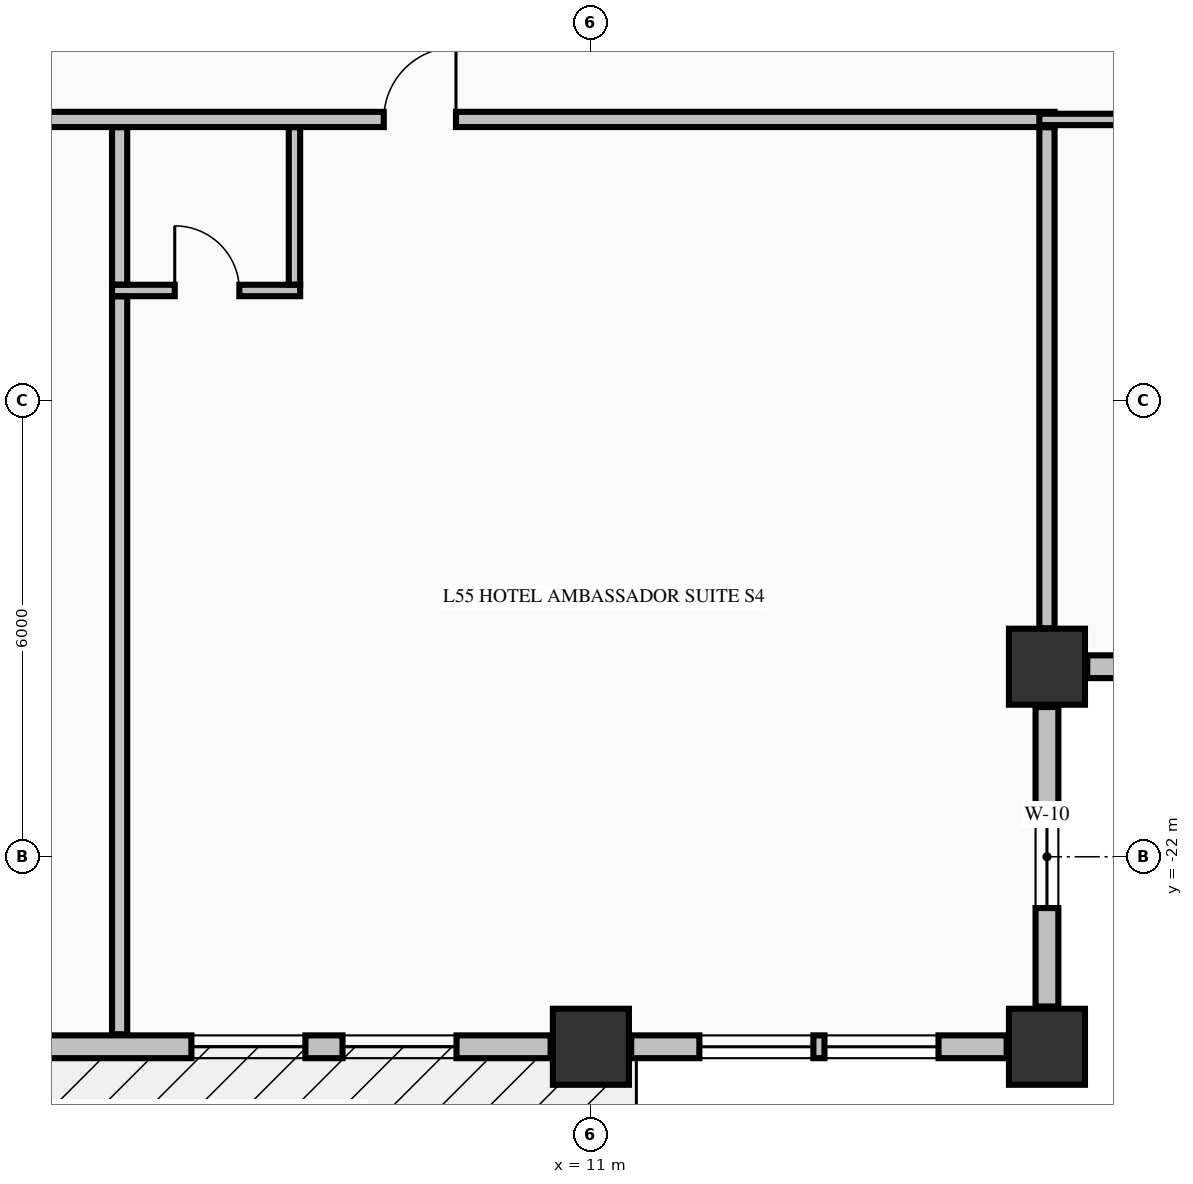
"""IFC4 building model, lengths in metres.
Left out: names, types, materials, properties, quantities, classifications, styles, units other than length and angle.
Written with IfcOpenShell. Run it as: python <this file> out.ifc"""

import sys

from ifc_helpers import new_model, si_unit, direction, frame, frame_2d, origin, origin_2d, place, context, subcontext, project, spatial, rectangle, extrude, element, fill, save


model = new_model("IFC4")
c1 = context("Model", 3, precision=1e-05, world=origin(), true_north=direction((0.0, 1.0)))
c2 = subcontext(c1, "Body", "Model", "MODEL_VIEW")
j1 = project(units=[si_unit("LENGTHUNIT", "METRE"), si_unit("PLANEANGLEUNIT", "RADIAN")], contexts=[c1])
p1 = place(None, origin())
s1 = spatial("IfcSite", under=j1, at=p1, CompositionType="ELEMENT")
p2 = place(p1, origin())
s2 = spatial("IfcBuilding", under=s1, at=p2, CompositionType="ELEMENT")
p3 = place(p2, frame((0.0, 0.0, 211.86)))
s3 = spatial("IfcBuildingStorey", under=s2, at=p3, CompositionType="ELEMENT", Elevation=211.86)
for number, where, z_axis, x_axis in (
    (1, (11.0, -24.5, -0.325), (0.0, 0.0, 1.0), (1.0, 0.0, 0.0)),
    (2, (17.0, -24.5, -0.325), (0.0, 0.0, 1.0), (1.0, 0.0, 0.0)),
    (3, (17.0, -19.5, -0.325), (0.0, 0.0, 1.0), (1.0, 0.0, 0.0)),
):
    element("IfcColumn", number, at=place(p3, frame(where, z_axis=z_axis, x_axis=x_axis)), inside=s3, PredefinedType="COLUMN", context=c2, shape_type="SweptSolid", body=[
        extrude(rectangle(XDim=1.0, YDim=1.0, at=origin_2d()), origin(), (0.0, 0.0, 1.0), 3.475),
    ])
p4 = place(p3, frame((17.0, -23.97, 0.0), z_axis=(0.0, 0.0, 1.0), x_axis=(0.0, 1.0, 0.0)))
e4 = element("IfcWall", 4, at=p4, inside=s3, PredefinedType="STANDARD", context=c2, shape_type="SweptSolid", body=[
    extrude(rectangle(XDim=3.94, YDim=0.3, at=frame_2d((1.97, 0.0))), origin(), (0.0, 0.0, 1.0), 2.542),
])
p5 = place(p4, frame((1.295, 0.0, 0.68)))
e5 = element("IfcOpeningElement", 5, at=p5, cuts=e4, PredefinedType="OPENING", context=c2, shape_type="SweptSolid", body=[
    extrude(rectangle(XDim=1.35, YDim=1.42, at=frame_2d((0.675, 0.71))), frame((0.0, 0.16, 0.0), z_axis=(0.0, -1.0, 0.0), x_axis=(1.0, 0.0, 0.0)), (0.0, 0.0, 1.0), 0.32),
])
p6 = place(p3, frame((17.53, -19.5, 0.0), z_axis=(0.0, 0.0, 1.0), x_axis=(1.0, 0.0, 0.0)))
e6 = element("IfcWall", 6, at=p6, inside=s3, PredefinedType="STANDARD", context=c2, shape_type="SweptSolid", body=[
    extrude(rectangle(XDim=3.94, YDim=0.3, at=frame_2d((1.97, 0.0))), origin(), (0.0, 0.0, 1.0), 2.542),
])
p7 = place(p6, frame((1.295, 0.0, 0.68)))
e7 = element("IfcOpeningElement", 7, at=p7, cuts=e6, PredefinedType="OPENING", context=c2, shape_type="SweptSolid", body=[
    extrude(rectangle(XDim=1.35, YDim=1.42, at=frame_2d((0.675, 0.71))), frame((0.0, 0.16, 0.0), z_axis=(0.0, -1.0, 0.0), x_axis=(1.0, 0.0, 0.0)), (0.0, 0.0, 1.0), 0.32),
])
p8 = place(p3, frame((0.53, -24.5, 0.0), z_axis=(0.0, 0.0, 1.0), x_axis=(1.0, 0.0, 0.0)))
e8 = element("IfcWall", 8, at=p8, inside=s3, PredefinedType="STANDARD", context=c2, shape_type="SweptSolid", body=[
    extrude(rectangle(XDim=9.94, YDim=0.3, at=frame_2d((4.97, 0.0))), origin(), (0.0, 0.0, 1.0), 2.542),
])
p9 = place(p8, frame((1.238, 0.0, 0.72)))
e9 = element("IfcOpeningElement", 9, at=p9, cuts=e8, PredefinedType="OPENING", context=c2, shape_type="SweptSolid", body=[
    extrude(rectangle(XDim=1.5, YDim=1.6, at=frame_2d((0.75, 0.8))), frame((0.0, 0.16, 0.0), z_axis=(0.0, -1.0, 0.0), x_axis=(1.0, 0.0, 0.0)), (0.0, 0.0, 1.0), 0.32),
])
p10 = place(p8, frame((5.214, 0.0, 0.72)))
e10 = element("IfcOpeningElement", 10, at=p10, cuts=e8, PredefinedType="OPENING", context=c2, shape_type="SweptSolid", body=[
    extrude(rectangle(XDim=1.5, YDim=1.6, at=frame_2d((0.75, 0.8))), frame((0.0, 0.16, 0.0), z_axis=(0.0, -1.0, 0.0), x_axis=(1.0, 0.0, 0.0)), (0.0, 0.0, 1.0), 0.32),
])
p11 = place(p8, frame((7.202, 0.0, 0.72)))
e11 = element("IfcOpeningElement", 11, at=p11, cuts=e8, PredefinedType="OPENING", context=c2, shape_type="SweptSolid", body=[
    extrude(rectangle(XDim=1.5, YDim=1.6, at=frame_2d((0.75, 0.8))), frame((0.0, 0.16, 0.0), z_axis=(0.0, -1.0, 0.0), x_axis=(1.0, 0.0, 0.0)), (0.0, 0.0, 1.0), 0.32),
])
p12 = place(p3, frame((11.53, -24.5, 0.0), z_axis=(0.0, 0.0, 1.0), x_axis=(1.0, 0.0, 0.0)))
e12 = element("IfcWall", 12, at=p12, inside=s3, PredefinedType="STANDARD", context=c2, shape_type="SweptSolid", body=[
    extrude(rectangle(XDim=4.94, YDim=0.3, at=frame_2d((2.47, 0.0))), origin(), (0.0, 0.0, 1.0), 2.542),
])
p13 = place(p12, frame((0.897, 0.0, 0.72)))
e13 = element("IfcOpeningElement", 13, at=p13, cuts=e12, PredefinedType="OPENING", context=c2, shape_type="SweptSolid", body=[
    extrude(rectangle(XDim=1.5, YDim=1.6, at=frame_2d((0.75, 0.8))), frame((0.0, 0.16, 0.0), z_axis=(0.0, -1.0, 0.0), x_axis=(1.0, 0.0, 0.0)), (0.0, 0.0, 1.0), 0.32),
])
p14 = place(p12, frame((2.543, 0.0, 0.72)))
e14 = element("IfcOpeningElement", 14, at=p14, cuts=e12, PredefinedType="OPENING", context=c2, shape_type="SweptSolid", body=[
    extrude(rectangle(XDim=1.5, YDim=1.6, at=frame_2d((0.75, 0.8))), frame((0.0, 0.16, 0.0), z_axis=(0.0, -1.0, 0.0), x_axis=(1.0, 0.0, 0.0)), (0.0, 0.0, 1.0), 0.32),
])
p15 = place(p3, frame((4.7, -14.55, 0.0), z_axis=(0.0, 0.0, 1.0), x_axis=(1.0, 0.0, 0.0)))
e15 = element("IfcWall", 15, at=p15, inside=s3, PredefinedType="PARTITIONING", context=c2, shape_type="SweptSolid", body=[
    extrude(rectangle(XDim=2.475, YDim=0.15, at=frame_2d((1.238, 0.0))), origin(), (0.0, 0.0, 1.0), 3.15),
])
p16 = place(p15, frame((0.825, 0.0, 0.0)))
e16 = element("IfcOpeningElement", 16, at=p16, cuts=e15, PredefinedType="OPENING", context=c2, shape_type="SweptSolid", body=[
    extrude(rectangle(XDim=0.85, YDim=2.1, at=frame_2d((0.425, 1.05))), frame((0.0, 0.085, 0.0), z_axis=(0.0, -1.0, 0.0), x_axis=(1.0, 0.0, 0.0)), (0.0, 0.0, 1.0), 0.17),
])
p17 = place(p3, frame((-22.1, -12.3, 0.0), z_axis=(0.0, 0.0, 1.0), x_axis=(1.0, 0.0, 0.0)))
e17 = element("IfcWall", 17, at=p17, inside=s3, PredefinedType="PARTITIONING", context=c2, shape_type="SweptSolid", body=[
    extrude(rectangle(XDim=39.2, YDim=0.2, at=frame_2d((19.6, 0.0))), origin(), (0.0, 0.0, 1.0), 3.15),
])
p18 = place(p17, frame((4.725, 0.0, 0.0)))
e18 = element("IfcOpeningElement", 18, at=p18, cuts=e17, PredefinedType="OPENING", context=c2, shape_type="SweptSolid", body=[
    extrude(rectangle(XDim=0.95, YDim=2.15, at=frame_2d((0.475, 1.075))), frame((0.0, 0.11, 0.0), z_axis=(0.0, -1.0, 0.0), x_axis=(1.0, 0.0, 0.0)), (0.0, 0.0, 1.0), 0.22),
])
p19 = place(p17, frame((12.625, 0.0, 0.0)))
e19 = element("IfcOpeningElement", 19, at=p19, cuts=e17, PredefinedType="OPENING", context=c2, shape_type="SweptSolid", body=[
    extrude(rectangle(XDim=0.95, YDim=2.15, at=frame_2d((0.475, 1.075))), frame((0.0, 0.11, 0.0), z_axis=(0.0, -1.0, 0.0), x_axis=(1.0, 0.0, 0.0)), (0.0, 0.0, 1.0), 0.22),
])
p20 = place(p17, frame((19.375, 0.0, 0.0)))
e20 = element("IfcOpeningElement", 20, at=p20, cuts=e17, PredefinedType="OPENING", context=c2, shape_type="SweptSolid", body=[
    extrude(rectangle(XDim=0.95, YDim=2.15, at=frame_2d((0.475, 1.075))), frame((0.0, 0.11, 0.0), z_axis=(0.0, -1.0, 0.0), x_axis=(1.0, 0.0, 0.0)), (0.0, 0.0, 1.0), 0.22),
])
p21 = place(p17, frame((30.375, 0.0, 0.0)))
e21 = element("IfcOpeningElement", 21, at=p21, cuts=e17, PredefinedType="OPENING", context=c2, shape_type="SweptSolid", body=[
    extrude(rectangle(XDim=0.95, YDim=2.15, at=frame_2d((0.475, 1.075))), frame((0.0, 0.11, 0.0), z_axis=(0.0, -1.0, 0.0), x_axis=(1.0, 0.0, 0.0)), (0.0, 0.0, 1.0), 0.22),
])
p22 = place(p3, frame((16.9, -12.3, 0.0), z_axis=(0.0, 0.0, 1.0), x_axis=(1.0, 0.0, 0.0)))
e22 = element("IfcWall", 22, at=p22, inside=s3, PredefinedType="PARTITIONING", context=c2, shape_type="SweptSolid", body=[
    extrude(rectangle(XDim=3.175, YDim=0.15, at=frame_2d((1.587, 0.0))), origin(), (0.0, 0.0, 1.0), 3.15),
])
p23 = place(p3, frame((4.8, -24.335, 0.0), z_axis=(0.0, 0.0, 1.0), x_axis=(0.0, 1.0, 0.0)))
e23 = element("IfcWall", 23, at=p23, inside=s3, PredefinedType="PARTITIONING", context=c2, shape_type="SweptSolid", body=[
    extrude(rectangle(XDim=9.707, YDim=0.2, at=frame_2d((4.854, 0.0))), origin(), (0.0, 0.0, 1.0), 3.15),
])
p24 = place(p3, frame((4.8, -14.472, 0.0), z_axis=(0.0, 0.0, 1.0), x_axis=(0.0, 1.0, 0.0)))
e24 = element("IfcWall", 24, at=p24, inside=s3, PredefinedType="PARTITIONING", context=c2, shape_type="SweptSolid", body=[
    extrude(rectangle(XDim=2.069, YDim=0.2, at=frame_2d((1.034, 0.0))), origin(), (0.0, 0.0, 1.0), 3.15),
])
p25 = place(p3, frame((7.1, -14.472, 0.0), z_axis=(0.0, 0.0, 1.0), x_axis=(0.0, 1.0, 0.0)))
e25 = element("IfcWall", 25, at=p25, inside=s3, PredefinedType="PARTITIONING", context=c2, shape_type="SweptSolid", body=[
    extrude(rectangle(XDim=2.069, YDim=0.15, at=frame_2d((1.034, 0.0))), origin(), (0.0, 0.0, 1.0), 3.15),
])
p26 = place(p3, frame((17.0, -18.994, 0.0), z_axis=(0.0, 0.0, 1.0), x_axis=(0.0, 1.0, 0.0)))
e26 = element("IfcWall", 26, at=p26, inside=s3, PredefinedType="PARTITIONING", context=c2, shape_type="SweptSolid", body=[
    extrude(rectangle(XDim=6.591, YDim=0.2, at=frame_2d((3.295, 0.0))), origin(), (0.0, 0.0, 1.0), 3.15),
])
p27 = place(p5, origin())
e27 = element("IfcWindow", 27, at=p27, inside=s3, PartitioningType="SINGLE_PANEL", PredefinedType="WINDOW", context=c2, shape_type="SweptSolid", body=[
    extrude(rectangle(XDim=1.35, YDim=1.42, at=frame_2d((0.675, 0.71))), frame((0.0, 0.03, 0.0), z_axis=(0.0, -1.0, 0.0), x_axis=(1.0, 0.0, 0.0)), (0.0, 0.0, 1.0), 0.06),
])
fill(e5, e27)
p28 = place(p10, origin())
e28 = element("IfcWindow", 28, at=p28, inside=s3, PartitioningType="SINGLE_PANEL", PredefinedType="WINDOW", context=c2, shape_type="SweptSolid", body=[
    extrude(rectangle(XDim=1.5, YDim=1.6, at=frame_2d((0.75, 0.8))), frame((0.0, 0.03, 0.0), z_axis=(0.0, -1.0, 0.0), x_axis=(1.0, 0.0, 0.0)), (0.0, 0.0, 1.0), 0.06),
])
fill(e10, e28)
p29 = place(p11, origin())
e29 = element("IfcWindow", 29, at=p29, inside=s3, PartitioningType="SINGLE_PANEL", PredefinedType="WINDOW", context=c2, shape_type="SweptSolid", body=[
    extrude(rectangle(XDim=1.5, YDim=1.6, at=frame_2d((0.75, 0.8))), frame((0.0, 0.03, 0.0), z_axis=(0.0, -1.0, 0.0), x_axis=(1.0, 0.0, 0.0)), (0.0, 0.0, 1.0), 0.06),
])
fill(e11, e29)
p30 = place(p13, origin())
e30 = element("IfcWindow", 30, at=p30, inside=s3, PartitioningType="SINGLE_PANEL", PredefinedType="WINDOW", context=c2, shape_type="SweptSolid", body=[
    extrude(rectangle(XDim=1.5, YDim=1.6, at=frame_2d((0.75, 0.8))), frame((0.0, 0.03, 0.0), z_axis=(0.0, -1.0, 0.0), x_axis=(1.0, 0.0, 0.0)), (0.0, 0.0, 1.0), 0.06),
])
fill(e13, e30)
p31 = place(p14, origin())
e31 = element("IfcWindow", 31, at=p31, inside=s3, PartitioningType="SINGLE_PANEL", PredefinedType="WINDOW", context=c2, shape_type="SweptSolid", body=[
    extrude(rectangle(XDim=1.5, YDim=1.6, at=frame_2d((0.75, 0.8))), frame((0.0, 0.03, 0.0), z_axis=(0.0, -1.0, 0.0), x_axis=(1.0, 0.0, 0.0)), (0.0, 0.0, 1.0), 0.06),
])
fill(e14, e31)
p32 = place(p21, origin())
e32 = element("IfcDoor", 32, at=p32, inside=s3, OperationType="SINGLE_SWING_RIGHT", PredefinedType="DOOR", context=c2, shape_type="SweptSolid", body=[
    extrude(rectangle(XDim=0.95, YDim=2.15, at=frame_2d((0.475, 1.075))), frame((0.0, 0.025, 0.0), z_axis=(0.0, -1.0, 0.0), x_axis=(1.0, 0.0, 0.0)), (0.0, 0.0, 1.0), 0.05),
])
fill(e21, e32)
p33 = place(p16, origin())
e33 = element("IfcDoor", 33, at=p33, inside=s3, OperationType="SINGLE_SWING_LEFT", PredefinedType="DOOR", context=c2, shape_type="SweptSolid", body=[
    extrude(rectangle(XDim=0.85, YDim=2.1, at=frame_2d((0.425, 1.05))), frame((0.0, 0.025, 0.0), z_axis=(0.0, -1.0, 0.0), x_axis=(1.0, 0.0, 0.0)), (0.0, 0.0, 1.0), 0.05),
])
fill(e16, e33)
save(model, sys.argv[1])
